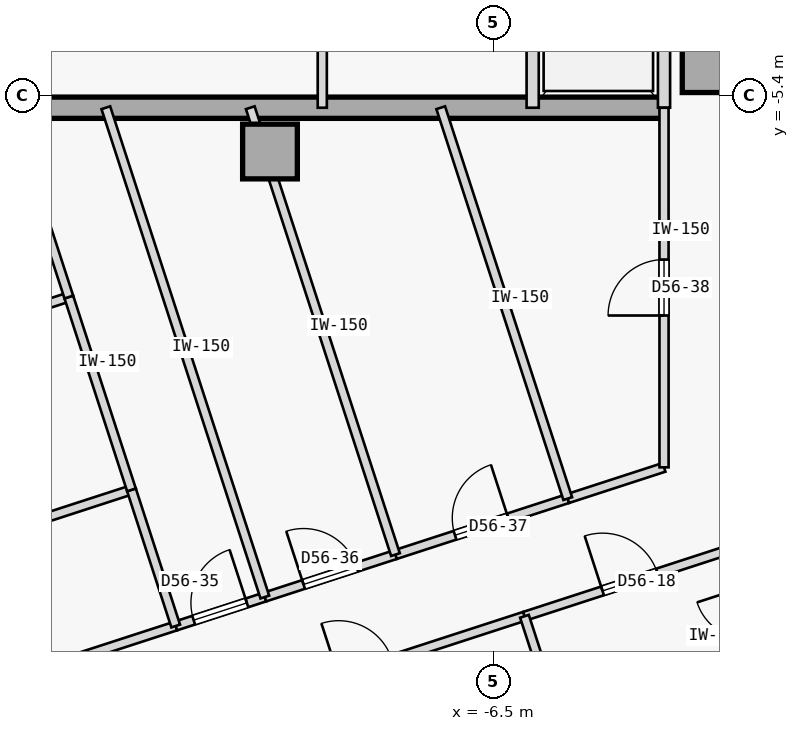
"""IFC4 building model, lengths in metres.
Left out: names, types, materials, properties, quantities, classifications, styles, units other than length and angle.
Written with IfcOpenShell. Run it as: python <this file> out.ifc"""

import sys

from ifc_helpers import new_model, si_unit, direction, frame, frame_2d, origin, origin_2d, place, context, subcontext, project, spatial, rectangle, extrude, element, fill, save


model = new_model("IFC4")
c1 = context("Model", 3, precision=1e-05, world=origin(), true_north=direction((0.0, 1.0)))
c2 = subcontext(c1, "Body", "Model", "MODEL_VIEW")
j1 = project(units=[si_unit("LENGTHUNIT", "METRE"), si_unit("PLANEANGLEUNIT", "RADIAN")], contexts=[c1])
p1 = place(None, origin())
s1 = spatial("IfcSite", under=j1, at=p1, CompositionType="ELEMENT")
p2 = place(p1, origin())
s2 = spatial("IfcBuilding", under=s1, at=p2, CompositionType="ELEMENT")
p3 = place(p2, frame((0.0, 0.0, 214.25)))
s3 = spatial("IfcBuildingStorey", under=s2, at=p3, CompositionType="ELEMENT", Elevation=214.25)
for number, where, z_axis, x_axis in (
    (1, (-10.18, -6.32, 0.0), (0.0, 0.0, 1.0), (1.0, 0.0, 0.0)),
    (2, (-2.95, -4.9, 0.0), (0.0, 0.0, 1.0), (1.0, 0.0, 0.0)),
):
    element("IfcColumn", number, at=place(p3, frame(where, z_axis=z_axis, x_axis=x_axis)), inside=s3, PredefinedType="COLUMN", context=c2, shape_type="SweptSolid", body=[
        extrude(rectangle(XDim=0.9, YDim=0.9, at=origin_2d()), origin(), (0.0, 0.0, 1.0), 3.35),
    ])
p4 = place(p3, frame((-14.56, -5.6, 0.0), z_axis=(0.0, 0.0, 1.0), x_axis=(1.0, 0.0, 0.0)))
e3 = element("IfcWall", 3, at=p4, inside=s3, PredefinedType="SHEAR", context=c2, shape_type="SweptSolid", body=[
    extrude(rectangle(XDim=10.86, YDim=0.35, at=frame_2d((5.43, 0.0))), origin(), (0.0, 0.0, 1.0), 3.125),
])
for number, where, z_axis, x_axis in (
    (4, (-3.7, -5.6, 0.0), (0.0, 0.0, 1.0), (0.0, 1.0, 0.0)),
    (5, (-5.86, -5.6, 0.0), (0.0, 0.0, 1.0), (0.0, 1.0, 0.0)),
):
    element("IfcWall", number, at=place(p3, frame(where, z_axis=z_axis, x_axis=x_axis)), inside=s3, PredefinedType="STANDARD", context=c2, shape_type="SweptSolid", body=[
        extrude(rectangle(XDim=2.65, YDim=0.2, at=frame_2d((1.325, 0.0))), origin(), (0.0, 0.0, 1.0), 3.125),
    ])
p5 = place(p3, frame((-9.32, -5.6, 0.0), z_axis=(0.0, 0.0, 1.0), x_axis=(0.0, 1.0, 0.0)))
e6 = element("IfcWall", 6, at=p5, inside=s3, PredefinedType="PARTITIONING", context=c2, shape_type="SweptSolid", body=[
    extrude(rectangle(XDim=2.65, YDim=0.15, at=frame_2d((1.325, 0.0))), origin(), (0.0, 0.0, 1.0), 3.125),
])
p6 = place(p3, frame((-5.995, -13.963, 0.0), z_axis=(0.0, 0.0, 1.0), x_axis=(0.951050780541, 0.309034646652, 0.0)))
e7 = element("IfcWall", 7, at=p6, inside=s3, PredefinedType="PARTITIONING", context=c2, shape_type="SweptSolid", body=[
    extrude(rectangle(XDim=3.65, YDim=0.15, at=frame_2d((1.825, 0.0))), origin(), (0.0, 0.0, 1.0), 3.125),
])
p7 = place(p6, frame((1.35, 0.0, 0.0)))
e8 = element("IfcOpeningElement", 8, at=p7, cuts=e7, PredefinedType="OPENING", context=c2, shape_type="SweptSolid", body=[
    extrude(rectangle(XDim=0.95, YDim=2.15, at=frame_2d((0.475, 1.075))), frame((0.0, 0.085, 0.0), z_axis=(0.0, -1.0, 0.0), x_axis=(1.0, 0.0, 0.0)), (0.0, 0.0, 1.0), 0.17),
])
p8 = place(p3, frame((-29.45, -19.881, 0.0), z_axis=(0.0, 0.0, 1.0), x_axis=(0.95105650271, 0.309017036186, 0.0)))
e9 = element("IfcWall", 9, at=p8, inside=s3, PredefinedType="PARTITIONING", context=c2, shape_type="SweptSolid", body=[
    extrude(rectangle(XDim=18.632, YDim=0.15, at=frame_2d((9.316, 0.0))), origin(), (0.0, 0.0, 1.0), 3.125),
])
p9 = place(p8, frame((8.856, 0.0, 0.0)))
e10 = element("IfcOpeningElement", 10, at=p9, cuts=e9, PredefinedType="OPENING", context=c2, shape_type="SweptSolid", body=[
    extrude(rectangle(XDim=0.92, YDim=2.15, at=frame_2d((0.46, 1.075))), frame((0.0, 0.085, 0.0), z_axis=(0.0, -1.0, 0.0), x_axis=(1.0, 0.0, 0.0)), (0.0, 0.0, 1.0), 0.17),
])
p10 = place(p3, frame((-11.23, -15.664, 0.0), z_axis=(0.0, 0.0, 1.0), x_axis=(0.951055579382, 0.309019877882, 0.0)))
e11 = element("IfcWall", 11, at=p10, inside=s3, PredefinedType="PARTITIONING", context=c2, shape_type="SweptSolid", body=[
    extrude(rectangle(XDim=5.504, YDim=0.15, at=frame_2d((2.752, 0.0))), origin(), (0.0, 0.0, 1.0), 3.125),
])
p11 = place(p10, frame((2.292, 0.0, 0.0)))
e12 = element("IfcOpeningElement", 12, at=p11, cuts=e11, PredefinedType="OPENING", context=c2, shape_type="SweptSolid", body=[
    extrude(rectangle(XDim=0.92, YDim=2.15, at=frame_2d((0.46, 1.075))), frame((0.0, 0.085, 0.0), z_axis=(0.0, -1.0, 0.0), x_axis=(1.0, 0.0, 0.0)), (0.0, 0.0, 1.0), 0.17),
])
p12 = place(p3, frame((-11.73, -14.123, 0.0), z_axis=(0.0, 0.0, 1.0), x_axis=(0.951032904484, 0.309089654614, 0.0)))
e13 = element("IfcWall", 13, at=p12, inside=s3, PredefinedType="PARTITIONING", context=c2, shape_type="SweptSolid", body=[
    extrude(rectangle(XDim=1.541, YDim=0.15, at=frame_2d((0.771, 0.0))), origin(), (0.0, 0.0, 1.0), 3.125),
])
p13 = place(p12, frame((0.311, 0.0, 0.0)))
e14 = element("IfcOpeningElement", 14, at=p13, cuts=e13, PredefinedType="OPENING", context=c2, shape_type="SweptSolid", body=[
    extrude(rectangle(XDim=0.92, YDim=2.15, at=frame_2d((0.46, 1.075))), frame((0.0, 0.085, 0.0), z_axis=(0.0, -1.0, 0.0), x_axis=(1.0, 0.0, 0.0)), (0.0, 0.0, 1.0), 0.17),
])
p14 = place(p3, frame((-10.265, -13.647, 0.0), z_axis=(0.0, 0.0, 1.0), x_axis=(0.951065832698, 0.308988319964, 0.0)))
e15 = element("IfcWall", 15, at=p14, inside=s3, PredefinedType="PARTITIONING", context=c2, shape_type="SweptSolid", body=[
    extrude(rectangle(XDim=2.259, YDim=0.15, at=frame_2d((1.129, 0.0))), origin(), (0.0, 0.0, 1.0), 3.125),
])
p15 = place(p14, frame((0.669, 0.0, 0.0)))
e16 = element("IfcOpeningElement", 16, at=p15, cuts=e15, PredefinedType="OPENING", context=c2, shape_type="SweptSolid", body=[
    extrude(rectangle(XDim=0.92, YDim=2.15, at=frame_2d((0.46, 1.075))), frame((0.0, 0.085, 0.0), z_axis=(0.0, -1.0, 0.0), x_axis=(1.0, 0.0, 0.0)), (0.0, 0.0, 1.0), 0.17),
])
p16 = place(p3, frame((-8.116, -12.949, 0.0), z_axis=(0.0, 0.0, 1.0), x_axis=(0.95107320803, 0.308965617775, 0.0)))
e17 = element("IfcWall", 17, at=p16, inside=s3, PredefinedType="PARTITIONING", context=c2, shape_type="SweptSolid", body=[
    extrude(rectangle(XDim=2.979, YDim=0.15, at=frame_2d((1.49, 0.0))), origin(), (0.0, 0.0, 1.0), 3.125),
])
p17 = place(p16, frame((1.03, 0.0, 0.0)))
e18 = element("IfcOpeningElement", 18, at=p17, cuts=e17, PredefinedType="OPENING", context=c2, shape_type="SweptSolid", body=[
    extrude(rectangle(XDim=0.92, YDim=2.15, at=frame_2d((0.46, 1.075))), frame((0.0, 0.085, 0.0), z_axis=(0.0, -1.0, 0.0), x_axis=(1.0, 0.0, 0.0)), (0.0, 0.0, 1.0), 0.17),
])
p18 = place(p3, frame((-5.283, -12.028, 0.0), z_axis=(0.0, 0.0, 1.0), x_axis=(0.951031913627, 0.309092703349, 0.0)))
e19 = element("IfcWall", 19, at=p18, inside=s3, PredefinedType="PARTITIONING", context=c2, shape_type="SweptSolid", body=[
    extrude(rectangle(XDim=1.665, YDim=0.15, at=frame_2d((0.833, 0.0))), origin(), (0.0, 0.0, 1.0), 3.125),
])
p19 = place(p3, frame((-3.7, -11.514, 0.0), z_axis=(0.0, 0.0, 1.0), x_axis=(-8.2572974e-05, 0.999999996591, 0.0)))
e20 = element("IfcWall", 20, at=p19, inside=s3, PredefinedType="PARTITIONING", context=c2, shape_type="SweptSolid", body=[
    extrude(rectangle(XDim=5.913, YDim=0.15, at=frame_2d((2.957, 0.0))), origin(), (0.0, 0.0, 1.0), 3.125),
])
p20 = place(p19, frame((2.497, 0.0, 0.0)))
e21 = element("IfcOpeningElement", 21, at=p20, cuts=e20, PredefinedType="OPENING", context=c2, shape_type="SweptSolid", body=[
    extrude(rectangle(XDim=0.92, YDim=2.15, at=frame_2d((0.46, 1.075))), frame((0.0, 0.085, 0.0), z_axis=(0.0, -1.0, 0.0), x_axis=(1.0, 0.0, 0.0)), (0.0, 0.0, 1.0), 0.17),
])
p21 = place(p3, frame((-4.972, -17.113, 0.0), z_axis=(0.0, 0.0, 1.0), x_axis=(-0.309009398695, 0.951058984248, 0.0)))
e22 = element("IfcWall", 22, at=p21, inside=s3, PredefinedType="PARTITIONING", context=c2, shape_type="SweptSolid", body=[
    extrude(rectangle(XDim=3.312, YDim=0.15, at=frame_2d((1.656, 0.0))), origin(), (0.0, 0.0, 1.0), 3.125),
])
p22 = place(p3, frame((-30.178, -17.642, 0.0), z_axis=(0.0, 0.0, 1.0), x_axis=(0.95105650271, 0.309017036186, 0.0)))
e23 = element("IfcWall", 23, at=p22, inside=s3, PredefinedType="PARTITIONING", context=c2, shape_type="SweptSolid", body=[
    extrude(rectangle(XDim=18.632, YDim=0.15, at=frame_2d((9.316, 0.0))), origin(), (0.0, 0.0, 1.0), 3.125),
])
p23 = place(p22, frame((8.856, 0.0, 0.0)))
e24 = element("IfcOpeningElement", 24, at=p23, cuts=e23, PredefinedType="OPENING", context=c2, shape_type="SweptSolid", body=[
    extrude(rectangle(XDim=0.92, YDim=2.15, at=frame_2d((0.46, 1.075))), frame((0.0, 0.085, 0.0), z_axis=(0.0, -1.0, 0.0), x_axis=(1.0, 0.0, 0.0)), (0.0, 0.0, 1.0), 0.17),
])
p24 = place(p3, frame((-11.73, -14.123, 0.0), z_axis=(0.0, 0.0, 1.0), x_axis=(-0.309062621189, 0.951041690035, 0.0)))
e25 = element("IfcWall", 25, at=p24, inside=s3, PredefinedType="PARTITIONING", context=c2, shape_type="SweptSolid", body=[
    extrude(rectangle(XDim=2.354, YDim=0.15, at=frame_2d((1.177, 0.0))), origin(), (0.0, 0.0, 1.0), 3.125),
])
p25 = place(p3, frame((-31.208, -14.471, 0.0), z_axis=(0.0, 0.0, 1.0), x_axis=(0.951057753948, 0.309013185244, 0.0)))
e26 = element("IfcWall", 26, at=p25, inside=s3, PredefinedType="PARTITIONING", context=c2, shape_type="SweptSolid", body=[
    extrude(rectangle(XDim=18.632, YDim=0.15, at=frame_2d((9.316, 0.0))), origin(), (0.0, 0.0, 1.0), 3.125),
])
p26 = place(p3, frame((-12.458, -11.884, 0.0), z_axis=(0.0, 0.0, 1.0), x_axis=(-0.308946982245, 0.951079261766, 0.0)))
e27 = element("IfcWall", 27, at=p26, inside=s3, PredefinedType="PARTITIONING", context=c2, shape_type="SweptSolid", body=[
    extrude(rectangle(XDim=3.334, YDim=0.15, at=frame_2d((1.667, 0.0))), origin(), (0.0, 0.0, 1.0), 3.125),
])
p27 = place(p3, frame((-13.488, -8.713, 0.0), z_axis=(0.0, 0.0, 1.0), x_axis=(-0.309082700143, 0.951035164687, 0.0)))
e28 = element("IfcWall", 28, at=p27, inside=s3, PredefinedType="PARTITIONING", context=c2, shape_type="SweptSolid", body=[
    extrude(rectangle(XDim=3.274, YDim=0.15, at=frame_2d((1.637, 0.0))), origin(), (0.0, 0.0, 1.0), 3.125),
])
p28 = place(p3, frame((-10.265, -13.647, 0.0), z_axis=(0.0, 0.0, 1.0), x_axis=(-0.309007776314, 0.951059511375, 0.0)))
e29 = element("IfcWall", 29, at=p28, inside=s3, PredefinedType="PARTITIONING", context=c2, shape_type="SweptSolid", body=[
    extrude(rectangle(XDim=8.461, YDim=0.15, at=frame_2d((4.23, 0.0))), origin(), (0.0, 0.0, 1.0), 3.125),
])
p29 = place(p3, frame((-8.116, -12.949, 0.0), z_axis=(0.0, 0.0, 1.0), x_axis=(-0.309005340707, 0.951060302722, 0.0)))
e30 = element("IfcWall", 30, at=p29, inside=s3, PredefinedType="PARTITIONING", context=c2, shape_type="SweptSolid", body=[
    extrude(rectangle(XDim=7.727, YDim=0.15, at=frame_2d((3.864, 0.0))), origin(), (0.0, 0.0, 1.0), 3.125),
])
p30 = place(p3, frame((-5.283, -12.028, 0.0), z_axis=(0.0, 0.0, 1.0), x_axis=(-0.30901256406, 0.95105795578, 0.0)))
e31 = element("IfcWall", 31, at=p30, inside=s3, PredefinedType="PARTITIONING", context=c2, shape_type="SweptSolid", body=[
    extrude(rectangle(XDim=6.759, YDim=0.15, at=frame_2d((3.379, 0.0))), origin(), (0.0, 0.0, 1.0), 3.125),
])
p31 = place(p7, origin())
e32 = element("IfcDoor", 32, at=p31, inside=s3, OperationType="SINGLE_SWING_LEFT", PredefinedType="DOOR", context=c2, shape_type="SweptSolid", body=[
    extrude(rectangle(XDim=0.95, YDim=2.15, at=frame_2d((0.475, 1.075))), frame((0.0, 0.025, 0.0), z_axis=(0.0, -1.0, 0.0), x_axis=(1.0, 0.0, 0.0)), (0.0, 0.0, 1.0), 0.05),
])
fill(e8, e32)
p32 = place(p13, origin())
e33 = element("IfcDoor", 33, at=p32, inside=s3, OperationType="SINGLE_SWING_RIGHT", PredefinedType="DOOR", context=c2, shape_type="SweptSolid", body=[
    extrude(rectangle(XDim=0.92, YDim=2.15, at=frame_2d((0.46, 1.075))), frame((0.0, 0.025, 0.0), z_axis=(0.0, -1.0, 0.0), x_axis=(1.0, 0.0, 0.0)), (0.0, 0.0, 1.0), 0.05),
])
fill(e14, e33)
p33 = place(p15, origin())
e34 = element("IfcDoor", 34, at=p33, inside=s3, OperationType="SINGLE_SWING_LEFT", PredefinedType="DOOR", context=c2, shape_type="SweptSolid", body=[
    extrude(rectangle(XDim=0.92, YDim=2.15, at=frame_2d((0.46, 1.075))), frame((0.0, 0.025, 0.0), z_axis=(0.0, -1.0, 0.0), x_axis=(1.0, 0.0, 0.0)), (0.0, 0.0, 1.0), 0.05),
])
fill(e16, e34)
p34 = place(p17, origin())
e35 = element("IfcDoor", 35, at=p34, inside=s3, OperationType="SINGLE_SWING_RIGHT", PredefinedType="DOOR", context=c2, shape_type="SweptSolid", body=[
    extrude(rectangle(XDim=0.92, YDim=2.15, at=frame_2d((0.46, 1.075))), frame((0.0, 0.025, 0.0), z_axis=(0.0, -1.0, 0.0), x_axis=(1.0, 0.0, 0.0)), (0.0, 0.0, 1.0), 0.05),
])
fill(e18, e35)
p35 = place(p20, origin())
e36 = element("IfcDoor", 36, at=p35, inside=s3, OperationType="SINGLE_SWING_LEFT", PredefinedType="DOOR", context=c2, shape_type="SweptSolid", body=[
    extrude(rectangle(XDim=0.92, YDim=2.15, at=frame_2d((0.46, 1.075))), frame((0.0, 0.025, 0.0), z_axis=(0.0, -1.0, 0.0), x_axis=(1.0, 0.0, 0.0)), (0.0, 0.0, 1.0), 0.05),
])
fill(e21, e36)
save(model, sys.argv[1])
